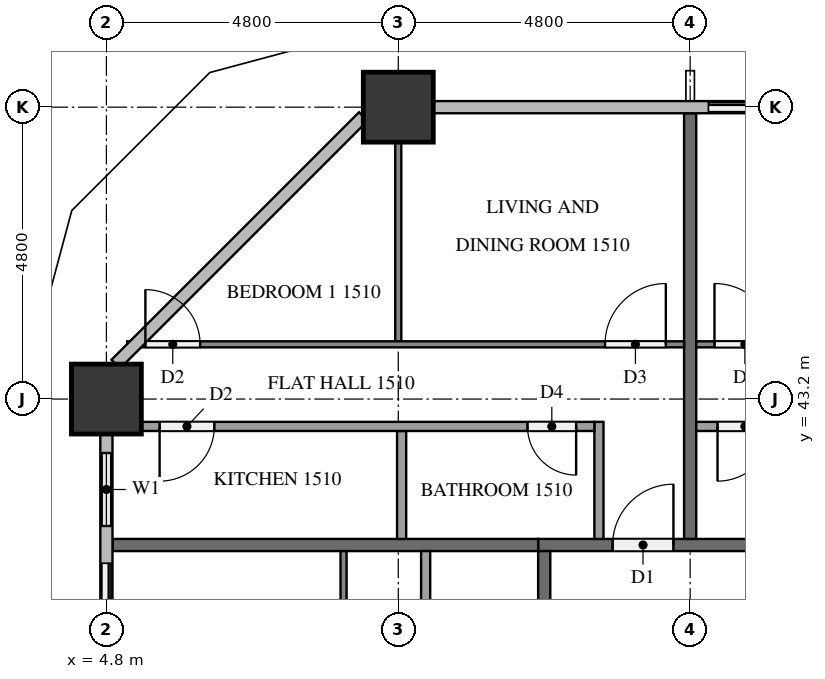
"""IFC4 building model, lengths in metres.
Left out: names, types, materials, properties, quantities, classifications, styles, units other than length and angle.
Written with IfcOpenShell. Run it as: python <this file> out.ifc"""

import sys

from ifc_helpers import new_model, si_unit, direction, frame, frame_2d, origin, origin_2d, place, context, subcontext, project, spatial, rectangle, extrude, element, fill, save


model = new_model("IFC4")
c1 = context("Model", 3, precision=1e-05, world=origin(), true_north=direction((0.0, 1.0)))
c2 = subcontext(c1, "Body", "Model", "MODEL_VIEW")
j1 = project(units=[si_unit("LENGTHUNIT", "METRE"), si_unit("PLANEANGLEUNIT", "RADIAN")], contexts=[c1])
p1 = place(None, origin())
s1 = spatial("IfcSite", under=j1, at=p1, CompositionType="ELEMENT")
p2 = place(p1, origin())
s2 = spatial("IfcBuilding", under=s1, at=p2, CompositionType="ELEMENT")
p3 = place(p2, frame((0.0, 0.0, 62.8)))
s3 = spatial("IfcBuildingStorey", under=s2, at=p3, CompositionType="ELEMENT", Elevation=62.8)
for number, where, z_axis, x_axis in (
    (1, (9.6, 48.0, 0.0), (0.0, 0.0, 1.0), (1.0, 0.0, 0.0)),
    (2, (4.8, 43.2, 0.0), (0.0, 0.0, 1.0), (1.0, 0.0, 0.0)),
):
    element("IfcColumn", number, at=place(p3, frame(where, z_axis=z_axis, x_axis=x_axis)), inside=s3, PredefinedType="COLUMN", context=c2, shape_type="SweptSolid", body=[
        extrude(rectangle(XDim=1.15, YDim=1.15, at=origin_2d()), origin(), (0.0, 0.0, 1.0), 3.2),
    ])
p4 = place(p3, frame((16.8, 48.0, 0.0), z_axis=(0.0, 0.0, 1.0), x_axis=(-1.0, 0.0, 0.0)))
e3 = element("IfcWall", 3, at=p4, inside=s3, PredefinedType="SOLIDWALL", context=c2, shape_type="SweptSolid", body=[
    extrude(rectangle(XDim=2.4, YDim=0.15, at=frame_2d((1.2, 0.0))), origin(), (0.0, 0.0, 1.0), 3.2),
])
p5 = place(p4, frame((0.3, 0.0, 0.0)))
e4 = element("IfcOpeningElement", 4, at=p5, cuts=e3, PredefinedType="OPENING", context=c2, shape_type="SweptSolid", body=[
    extrude(rectangle(XDim=1.8, YDim=2.4, at=frame_2d((0.9, 1.2))), frame((0.0, 0.085, 0.0), z_axis=(0.0, -1.0, 0.0), x_axis=(1.0, 0.0, 0.0)), (0.0, 0.0, 1.0), 0.17),
])
p6 = place(p3, frame((4.8, 42.625, 0.0), z_axis=(0.0, 0.0, 1.0), x_axis=(0.0, -1.0, 0.0)))
e5 = element("IfcWall", 5, at=p6, inside=s3, PredefinedType="SOLIDWALL", context=c2, shape_type="SweptSolid", body=[
    extrude(rectangle(XDim=4.225, YDim=0.15, at=frame_2d((2.113, 0.0))), origin(), (0.0, 0.0, 1.0), 3.2),
])
p7 = place(p6, frame((0.312, 0.0, 0.9)))
e6 = element("IfcOpeningElement", 6, at=p7, cuts=e5, PredefinedType="OPENING", context=c2, shape_type="SweptSolid", body=[
    extrude(rectangle(XDim=1.2, YDim=1.4, at=frame_2d((0.6, 0.7))), frame((0.0, 0.085, 0.0), z_axis=(0.0, -1.0, 0.0), x_axis=(1.0, 0.0, 0.0)), (0.0, 0.0, 1.0), 0.17),
])
p8 = place(p6, frame((2.125, 0.0, 0.0)))
e7 = element("IfcOpeningElement", 7, at=p8, cuts=e5, PredefinedType="OPENING", context=c2, shape_type="SweptSolid", body=[
    extrude(rectangle(XDim=1.8, YDim=2.4, at=frame_2d((0.9, 1.2))), frame((0.0, 0.085, 0.0), z_axis=(0.0, -1.0, 0.0), x_axis=(1.0, 0.0, 0.0)), (0.0, 0.0, 1.0), 0.17),
])
p9 = place(p3, frame((11.9, 40.8, 0.0), z_axis=(0.0, 0.0, 1.0), x_axis=(1.0, 0.0, 0.0)))
e8 = element("IfcWall", 8, at=p9, inside=s3, PredefinedType="PARTITIONING", context=c2, shape_type="SweptSolid", body=[
    extrude(rectangle(XDim=38.6, YDim=0.2, at=frame_2d((19.3, 0.0))), origin(), (0.0, 0.0, 1.0), 3.2),
])
p10 = place(p9, frame((36.375, 0.0, 0.0)))
e9 = element("IfcOpeningElement", 9, at=p10, cuts=e8, PredefinedType="OPENING", context=c2, shape_type="SweptSolid", body=[
    extrude(rectangle(XDim=1.0, YDim=2.1, at=frame_2d((0.5, 1.05))), frame((0.0, 0.11, 0.0), z_axis=(0.0, -1.0, 0.0), x_axis=(1.0, 0.0, 0.0)), (0.0, 0.0, 1.0), 0.22),
])
p11 = place(p9, frame((17.125, 0.0, 0.0)))
e10 = element("IfcOpeningElement", 10, at=p11, cuts=e8, PredefinedType="OPENING", context=c2, shape_type="SweptSolid", body=[
    extrude(rectangle(XDim=1.1, YDim=2.1, at=frame_2d((0.55, 1.05))), frame((0.0, 0.11, 0.0), z_axis=(0.0, -1.0, 0.0), x_axis=(1.0, 0.0, 0.0)), (0.0, 0.0, 1.0), 0.22),
])
p12 = place(p9, frame((15.625, 0.0, 0.0)))
e11 = element("IfcOpeningElement", 11, at=p12, cuts=e8, PredefinedType="OPENING", context=c2, shape_type="SweptSolid", body=[
    extrude(rectangle(XDim=1.0, YDim=2.1, at=frame_2d((0.5, 1.05))), frame((0.0, 0.11, 0.0), z_axis=(0.0, -1.0, 0.0), x_axis=(1.0, 0.0, 0.0)), (0.0, 0.0, 1.0), 0.22),
])
p13 = place(p9, frame((1.225, 0.0, 0.0)))
e12 = element("IfcOpeningElement", 12, at=p13, cuts=e8, PredefinedType="OPENING", context=c2, shape_type="SweptSolid", body=[
    extrude(rectangle(XDim=1.0, YDim=2.1, at=frame_2d((0.5, 1.05))), frame((0.0, 0.11, 0.0), z_axis=(0.0, -1.0, 0.0), x_axis=(1.0, 0.0, 0.0)), (0.0, 0.0, 1.0), 0.22),
])
p14 = place(p3, frame((12.0, 12.1, 0.0), z_axis=(0.0, 0.0, 1.0), x_axis=(0.0, 1.0, 0.0)))
e13 = element("IfcWall", 13, at=p14, inside=s3, PredefinedType="PARTITIONING", context=c2, shape_type="SweptSolid", body=[
    extrude(rectangle(XDim=28.6, YDim=0.2, at=frame_2d((14.3, 0.0))), origin(), (0.0, 0.0, 1.0), 3.2),
])
p15 = place(p14, frame((19.375, 0.0, 0.0)))
e14 = element("IfcOpeningElement", 14, at=p15, cuts=e13, PredefinedType="OPENING", context=c2, shape_type="SweptSolid", body=[
    extrude(rectangle(XDim=1.0, YDim=2.1, at=frame_2d((0.5, 1.05))), frame((0.0, 0.11, 0.0), z_axis=(0.0, -1.0, 0.0), x_axis=(1.0, 0.0, 0.0)), (0.0, 0.0, 1.0), 0.22),
])
p16 = place(p14, frame((12.175, 0.0, 0.0)))
e15 = element("IfcOpeningElement", 15, at=p16, cuts=e13, PredefinedType="OPENING", context=c2, shape_type="SweptSolid", body=[
    extrude(rectangle(XDim=1.0, YDim=2.1, at=frame_2d((0.5, 1.05))), frame((0.0, 0.11, 0.0), z_axis=(0.0, -1.0, 0.0), x_axis=(1.0, 0.0, 0.0)), (0.0, 0.0, 1.0), 0.22),
])
p17 = place(p14, frame((2.575, 0.0, 0.0)))
e16 = element("IfcOpeningElement", 16, at=p17, cuts=e13, PredefinedType="OPENING", context=c2, shape_type="SweptSolid", body=[
    extrude(rectangle(XDim=1.0, YDim=2.1, at=frame_2d((0.5, 1.05))), frame((0.0, 0.11, 0.0), z_axis=(0.0, -1.0, 0.0), x_axis=(1.0, 0.0, 0.0)), (0.0, 0.0, 1.0), 0.22),
])
p18 = place(p14, frame((1.025, 0.0, 0.0)))
e17 = element("IfcOpeningElement", 17, at=p18, cuts=e13, PredefinedType="OPENING", context=c2, shape_type="SweptSolid", body=[
    extrude(rectangle(XDim=1.0, YDim=2.1, at=frame_2d((0.5, 1.05))), frame((0.0, 0.11, 0.0), z_axis=(0.0, -1.0, 0.0), x_axis=(1.0, 0.0, 0.0)), (0.0, 0.0, 1.0), 0.22),
])
for number, where, z_axis, x_axis in (
    (18, (14.4, 47.9, 0.0), (0.0, 0.0, 1.0), (0.0, -1.0, 0.0)),
    (19, (4.9, 40.8, 0.0), (0.0, 0.0, 1.0), (1.0, 0.0, 0.0)),
):
    element("IfcWall", number, at=place(p3, frame(where, z_axis=z_axis, x_axis=x_axis)), inside=s3, PredefinedType="PARTITIONING", context=c2, shape_type="SweptSolid", body=[
        extrude(rectangle(XDim=7.0, YDim=0.2, at=frame_2d((3.5, 0.0))), origin(), (0.0, 0.0, 1.0), 3.2),
    ])
p19 = place(p3, frame((14.5, 44.1, 0.0), z_axis=(0.0, 0.0, 1.0), x_axis=(1.0, 0.0, 0.0)))
e20 = element("IfcWall", 20, at=p19, inside=s3, PredefinedType="PARTITIONING", context=c2, shape_type="SweptSolid", body=[
    extrude(rectangle(XDim=14.2, YDim=0.1, at=frame_2d((7.1, 0.0))), origin(), (0.0, 0.0, 1.0), 3.2),
])
p20 = place(p19, frame((9.85, 0.0, 0.0)))
e21 = element("IfcOpeningElement", 21, at=p20, cuts=e20, PredefinedType="OPENING", context=c2, shape_type="SweptSolid", body=[
    extrude(rectangle(XDim=0.9, YDim=2.1, at=frame_2d((0.45, 1.05))), frame((0.0, 0.06, 0.0), z_axis=(0.0, -1.0, 0.0), x_axis=(1.0, 0.0, 0.0)), (0.0, 0.0, 1.0), 0.12),
])
p21 = place(p19, frame((8.25, 0.0, 0.0)))
e22 = element("IfcOpeningElement", 22, at=p21, cuts=e20, PredefinedType="OPENING", context=c2, shape_type="SweptSolid", body=[
    extrude(rectangle(XDim=0.9, YDim=2.1, at=frame_2d((0.45, 1.05))), frame((0.0, 0.06, 0.0), z_axis=(0.0, -1.0, 0.0), x_axis=(1.0, 0.0, 0.0)), (0.0, 0.0, 1.0), 0.12),
])
p22 = place(p19, frame((0.3, 0.0, 0.0)))
e23 = element("IfcOpeningElement", 23, at=p22, cuts=e20, PredefinedType="OPENING", context=c2, shape_type="SweptSolid", body=[
    extrude(rectangle(XDim=1.0, YDim=2.1, at=frame_2d((0.5, 1.05))), frame((0.0, 0.06, 0.0), z_axis=(0.0, -1.0, 0.0), x_axis=(1.0, 0.0, 0.0)), (0.0, 0.0, 1.0), 0.12),
])
p23 = place(p3, frame((27.225, 42.75, 0.0), z_axis=(0.0, 0.0, 1.0), x_axis=(-1.0, 0.0, 0.0)))
e24 = element("IfcWall", 24, at=p23, inside=s3, PredefinedType="PARTITIONING", context=c2, shape_type="SweptSolid", body=[
    extrude(rectangle(XDim=12.725, YDim=0.15, at=frame_2d((6.363, 0.0))), origin(), (0.0, 0.0, 1.0), 3.2),
])
p24 = place(p23, frame((1.812, 0.0, 0.0)))
e25 = element("IfcOpeningElement", 25, at=p24, cuts=e24, PredefinedType="OPENING", context=c2, shape_type="SweptSolid", body=[
    extrude(rectangle(XDim=0.8, YDim=2.1, at=frame_2d((0.4, 1.05))), frame((0.0, 0.085, 0.0), z_axis=(0.0, -1.0, 0.0), x_axis=(1.0, 0.0, 0.0)), (0.0, 0.0, 1.0), 0.17),
])
p25 = place(p23, frame((3.261, 0.0, 0.0)))
e26 = element("IfcOpeningElement", 26, at=p25, cuts=e24, PredefinedType="OPENING", context=c2, shape_type="SweptSolid", body=[
    extrude(rectangle(XDim=0.9, YDim=2.1, at=frame_2d((0.45, 1.05))), frame((0.0, 0.085, 0.0), z_axis=(0.0, -1.0, 0.0), x_axis=(1.0, 0.0, 0.0)), (0.0, 0.0, 1.0), 0.17),
])
p26 = place(p23, frame((11.475, 0.0, 0.0)))
e27 = element("IfcOpeningElement", 27, at=p26, cuts=e24, PredefinedType="OPENING", context=c2, shape_type="SweptSolid", body=[
    extrude(rectangle(XDim=0.9, YDim=2.1, at=frame_2d((0.45, 1.05))), frame((0.0, 0.085, 0.0), z_axis=(0.0, -1.0, 0.0), x_axis=(1.0, 0.0, 0.0)), (0.0, 0.0, 1.0), 0.17),
])
p27 = place(p3, frame((9.6, 44.15, 0.0), z_axis=(0.0, 0.0, 1.0), x_axis=(0.0, 1.0, 0.0)))
e28 = element("IfcWall", 28, at=p27, inside=s3, PredefinedType="PARTITIONING", context=c2, shape_type="SweptSolid", body=[
    extrude(rectangle(XDim=3.275, YDim=0.1, at=frame_2d((1.638, 0.0))), origin(), (0.0, 0.0, 1.0), 3.2),
])
p28 = place(p3, frame((5.141, 44.1, 0.0), z_axis=(0.0, 0.0, 1.0), x_axis=(1.0, 0.0, 0.0)))
e29 = element("IfcWall", 29, at=p28, inside=s3, PredefinedType="PARTITIONING", context=c2, shape_type="SweptSolid", body=[
    extrude(rectangle(XDim=9.159, YDim=0.1, at=frame_2d((4.58, 0.0))), origin(), (0.0, 0.0, 1.0), 3.2),
])
p29 = place(p28, frame((7.859, 0.0, 0.0)))
e30 = element("IfcOpeningElement", 30, at=p29, cuts=e29, PredefinedType="OPENING", context=c2, shape_type="SweptSolid", body=[
    extrude(rectangle(XDim=1.0, YDim=2.1, at=frame_2d((0.5, 1.05))), frame((0.0, 0.06, 0.0), z_axis=(0.0, -1.0, 0.0), x_axis=(1.0, 0.0, 0.0)), (0.0, 0.0, 1.0), 0.12),
])
p30 = place(p28, frame((0.3, 0.0, 0.0)))
e31 = element("IfcOpeningElement", 31, at=p30, cuts=e29, PredefinedType="OPENING", context=c2, shape_type="SweptSolid", body=[
    extrude(rectangle(XDim=0.9, YDim=2.1, at=frame_2d((0.45, 1.05))), frame((0.0, 0.06, 0.0), z_axis=(0.0, -1.0, 0.0), x_axis=(1.0, 0.0, 0.0)), (0.0, 0.0, 1.0), 0.12),
])
p31 = place(p3, frame((9.655, 40.9, 0.0), z_axis=(0.0, 0.0, 1.0), x_axis=(0.0, 1.0, 0.0)))
e32 = element("IfcWall", 32, at=p31, inside=s3, PredefinedType="PARTITIONING", context=c2, shape_type="SweptSolid", body=[
    extrude(rectangle(XDim=1.775, YDim=0.15, at=frame_2d((0.888, 0.0))), origin(), (0.0, 0.0, 1.0), 3.2),
])
p32 = place(p3, frame((12.9, 40.9, 0.0), z_axis=(0.0, 0.0, 1.0), x_axis=(0.0, 1.0, 0.0)))
e33 = element("IfcWall", 33, at=p32, inside=s3, PredefinedType="PARTITIONING", context=c2, shape_type="SweptSolid", body=[
    extrude(rectangle(XDim=1.925, YDim=0.15, at=frame_2d((0.962, 0.0))), origin(), (0.0, 0.0, 1.0), 3.2),
])
p33 = place(p3, frame((12.825, 42.75, 0.0), z_axis=(0.0, 0.0, 1.0), x_axis=(-1.0, 0.0, 0.0)))
e34 = element("IfcWall", 34, at=p33, inside=s3, PredefinedType="PARTITIONING", context=c2, shape_type="SweptSolid", body=[
    extrude(rectangle(XDim=7.45, YDim=0.15, at=frame_2d((3.725, 0.0))), origin(), (0.0, 0.0, 1.0), 3.2),
])
p34 = place(p33, frame((0.3, 0.0, 0.0)))
e35 = element("IfcOpeningElement", 35, at=p34, cuts=e34, PredefinedType="OPENING", context=c2, shape_type="SweptSolid", body=[
    extrude(rectangle(XDim=0.8, YDim=2.1, at=frame_2d((0.4, 1.05))), frame((0.0, 0.085, 0.0), z_axis=(0.0, -1.0, 0.0), x_axis=(1.0, 0.0, 0.0)), (0.0, 0.0, 1.0), 0.17),
])
p35 = place(p33, frame((6.25, 0.0, 0.0)))
e36 = element("IfcOpeningElement", 36, at=p35, cuts=e34, PredefinedType="OPENING", context=c2, shape_type="SweptSolid", body=[
    extrude(rectangle(XDim=0.9, YDim=2.1, at=frame_2d((0.45, 1.05))), frame((0.0, 0.085, 0.0), z_axis=(0.0, -1.0, 0.0), x_axis=(1.0, 0.0, 0.0)), (0.0, 0.0, 1.0), 0.17),
])
p36 = place(p3, frame((8.7, 31.3, 0.0), z_axis=(0.0, 0.0, 1.0), x_axis=(0.0, 1.0, 0.0)))
e37 = element("IfcWall", 37, at=p36, inside=s3, PredefinedType="PARTITIONING", context=c2, shape_type="SweptSolid", body=[
    extrude(rectangle(XDim=9.4, YDim=0.1, at=frame_2d((4.7, 0.0))), origin(), (0.0, 0.0, 1.0), 3.2),
])
p37 = place(p36, frame((3.45, 0.0, 0.0)))
e38 = element("IfcOpeningElement", 38, at=p37, cuts=e37, PredefinedType="OPENING", context=c2, shape_type="SweptSolid", body=[
    extrude(rectangle(XDim=0.9, YDim=2.1, at=frame_2d((0.45, 1.05))), frame((0.0, 0.06, 0.0), z_axis=(0.0, -1.0, 0.0), x_axis=(1.0, 0.0, 0.0)), (0.0, 0.0, 1.0), 0.12),
])
p38 = place(p36, frame((5.05, 0.0, 0.0)))
e39 = element("IfcOpeningElement", 39, at=p38, cuts=e37, PredefinedType="OPENING", context=c2, shape_type="SweptSolid", body=[
    extrude(rectangle(XDim=1.0, YDim=2.1, at=frame_2d((0.5, 1.05))), frame((0.0, 0.06, 0.0), z_axis=(0.0, -1.0, 0.0), x_axis=(1.0, 0.0, 0.0)), (0.0, 0.0, 1.0), 0.12),
])
p39 = place(p3, frame((10.05, 40.7, 0.0), z_axis=(0.0, 0.0, 1.0), x_axis=(0.0, -1.0, 0.0)))
e40 = element("IfcWall", 40, at=p39, inside=s3, PredefinedType="PARTITIONING", context=c2, shape_type="SweptSolid", body=[
    extrude(rectangle(XDim=7.925, YDim=0.15, at=frame_2d((3.962, 0.0))), origin(), (0.0, 0.0, 1.0), 3.2),
])
p40 = place(p39, frame((5.08, 0.0, 0.0)))
e41 = element("IfcOpeningElement", 41, at=p40, cuts=e40, PredefinedType="OPENING", context=c2, shape_type="SweptSolid", body=[
    extrude(rectangle(XDim=0.8, YDim=2.1, at=frame_2d((0.4, 1.05))), frame((0.0, 0.085, 0.0), z_axis=(0.0, -1.0, 0.0), x_axis=(1.0, 0.0, 0.0)), (0.0, 0.0, 1.0), 0.17),
])
p41 = place(p39, frame((3.53, 0.0, 0.0)))
e42 = element("IfcOpeningElement", 42, at=p41, cuts=e40, PredefinedType="OPENING", context=c2, shape_type="SweptSolid", body=[
    extrude(rectangle(XDim=0.9, YDim=2.1, at=frame_2d((0.45, 1.05))), frame((0.0, 0.085, 0.0), z_axis=(0.0, -1.0, 0.0), x_axis=(1.0, 0.0, 0.0)), (0.0, 0.0, 1.0), 0.17),
])
p42 = place(p5, origin())
e43 = element("IfcDoor", 43, at=p42, inside=s3, OperationType="SLIDING_TO_LEFT", PredefinedType="DOOR", context=c2, shape_type="SweptSolid", body=[
    extrude(rectangle(XDim=1.8, YDim=2.4, at=frame_2d((0.9, 1.2))), frame((0.0, 0.025, 0.0), z_axis=(0.0, -1.0, 0.0), x_axis=(1.0, 0.0, 0.0)), (0.0, 0.0, 1.0), 0.05),
])
fill(e4, e43)
p43 = place(p7, origin())
e44 = element("IfcWindow", 44, at=p43, inside=s3, PartitioningType="SINGLE_PANEL", PredefinedType="WINDOW", context=c2, shape_type="SweptSolid", body=[
    extrude(rectangle(XDim=1.2, YDim=1.4, at=frame_2d((0.6, 0.7))), frame((0.0, 0.03, 0.0), z_axis=(0.0, -1.0, 0.0), x_axis=(1.0, 0.0, 0.0)), (0.0, 0.0, 1.0), 0.06),
])
fill(e6, e44)
p44 = place(p8, origin())
e45 = element("IfcDoor", 45, at=p44, inside=s3, OperationType="SLIDING_TO_RIGHT", PredefinedType="DOOR", context=c2, shape_type="SweptSolid", body=[
    extrude(rectangle(XDim=1.8, YDim=2.4, at=frame_2d((0.9, 1.2))), frame((0.0, 0.025, 0.0), z_axis=(0.0, -1.0, 0.0), x_axis=(1.0, 0.0, 0.0)), (0.0, 0.0, 1.0), 0.05),
])
fill(e7, e45)
p45 = place(p13, origin())
e46 = element("IfcDoor", 46, at=p45, inside=s3, OperationType="SINGLE_SWING_RIGHT", PredefinedType="DOOR", context=c2, shape_type="SweptSolid", body=[
    extrude(rectangle(XDim=1.0, YDim=2.1, at=frame_2d((0.5, 1.05))), frame((0.0, 0.025, 0.0), z_axis=(0.0, -1.0, 0.0), x_axis=(1.0, 0.0, 0.0)), (0.0, 0.0, 1.0), 0.05),
])
fill(e12, e46)
p46 = place(p22, origin())
e47 = element("IfcDoor", 47, at=p46, inside=s3, OperationType="SINGLE_SWING_LEFT", PredefinedType="DOOR", context=c2, shape_type="SweptSolid", body=[
    extrude(rectangle(XDim=1.0, YDim=2.1, at=frame_2d((0.5, 1.05))), frame((0.0, 0.025, 0.0), z_axis=(0.0, -1.0, 0.0), x_axis=(1.0, 0.0, 0.0)), (0.0, 0.0, 1.0), 0.05),
])
fill(e23, e47)
p47 = place(p26, origin())
e48 = element("IfcDoor", 48, at=p47, inside=s3, OperationType="SINGLE_SWING_RIGHT", PredefinedType="DOOR", context=c2, shape_type="SweptSolid", body=[
    extrude(rectangle(XDim=0.9, YDim=2.1, at=frame_2d((0.45, 1.05))), frame((0.0, 0.025, 0.0), z_axis=(0.0, -1.0, 0.0), x_axis=(1.0, 0.0, 0.0)), (0.0, 0.0, 1.0), 0.05),
])
fill(e27, e48)
p48 = place(p29, origin())
e49 = element("IfcDoor", 49, at=p48, inside=s3, OperationType="SINGLE_SWING_RIGHT", PredefinedType="DOOR", context=c2, shape_type="SweptSolid", body=[
    extrude(rectangle(XDim=1.0, YDim=2.1, at=frame_2d((0.5, 1.05))), frame((0.0, 0.025, 0.0), z_axis=(0.0, -1.0, 0.0), x_axis=(1.0, 0.0, 0.0)), (0.0, 0.0, 1.0), 0.05),
])
fill(e30, e49)
p49 = place(p30, origin())
e50 = element("IfcDoor", 50, at=p49, inside=s3, OperationType="SINGLE_SWING_LEFT", PredefinedType="DOOR", context=c2, shape_type="SweptSolid", body=[
    extrude(rectangle(XDim=0.9, YDim=2.1, at=frame_2d((0.45, 1.05))), frame((0.0, 0.025, 0.0), z_axis=(0.0, -1.0, 0.0), x_axis=(1.0, 0.0, 0.0)), (0.0, 0.0, 1.0), 0.05),
])
fill(e31, e50)
p50 = place(p34, origin())
e51 = element("IfcDoor", 51, at=p50, inside=s3, OperationType="SINGLE_SWING_LEFT", PredefinedType="DOOR", context=c2, shape_type="SweptSolid", body=[
    extrude(rectangle(XDim=0.8, YDim=2.1, at=frame_2d((0.4, 1.05))), frame((0.0, 0.025, 0.0), z_axis=(0.0, -1.0, 0.0), x_axis=(1.0, 0.0, 0.0)), (0.0, 0.0, 1.0), 0.05),
])
fill(e35, e51)
p51 = place(p35, origin())
e52 = element("IfcDoor", 52, at=p51, inside=s3, OperationType="SINGLE_SWING_RIGHT", PredefinedType="DOOR", context=c2, shape_type="SweptSolid", body=[
    extrude(rectangle(XDim=0.9, YDim=2.1, at=frame_2d((0.45, 1.05))), frame((0.0, 0.025, 0.0), z_axis=(0.0, -1.0, 0.0), x_axis=(1.0, 0.0, 0.0)), (0.0, 0.0, 1.0), 0.05),
])
fill(e36, e52)
save(model, sys.argv[1])
